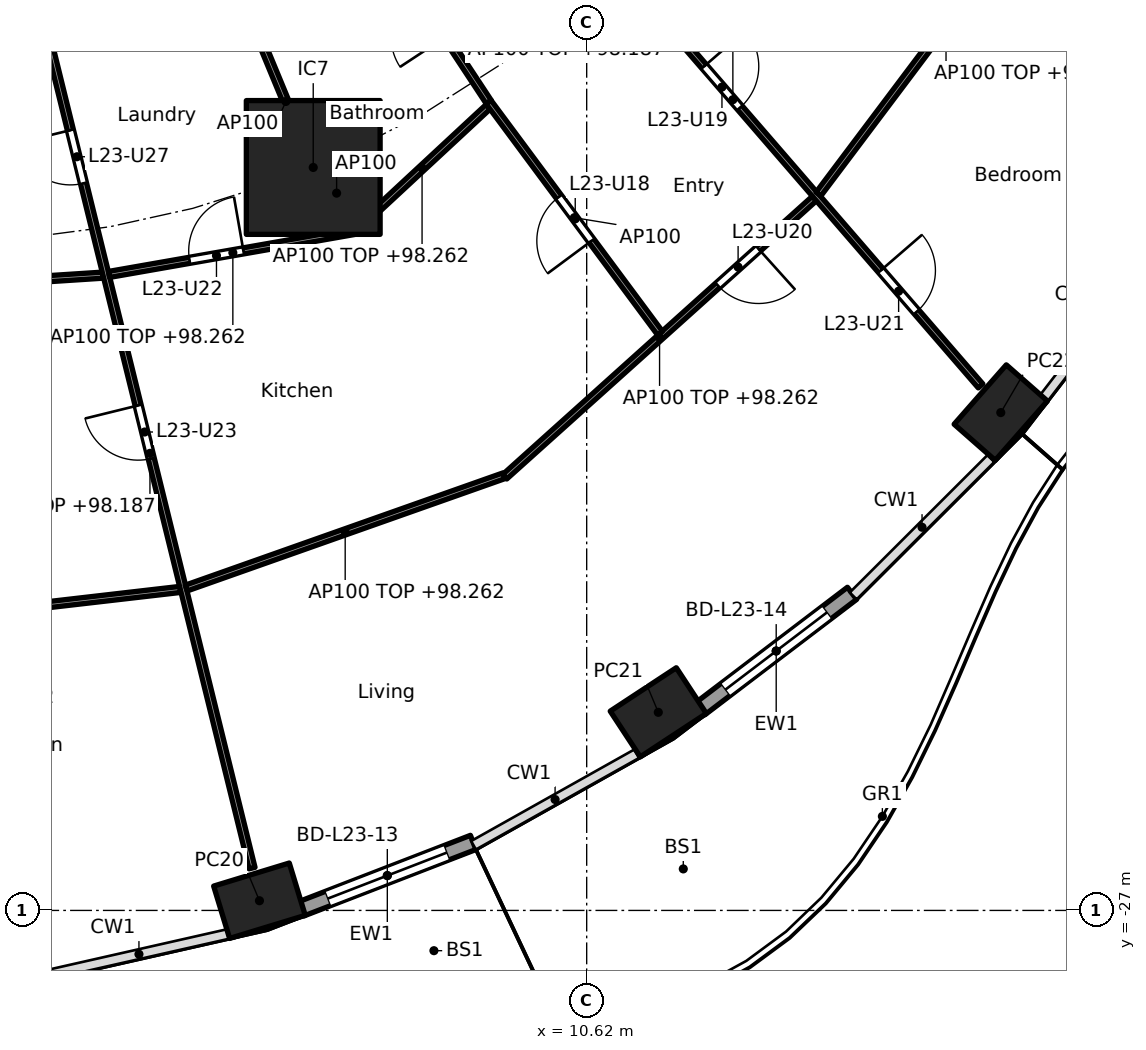
"""IFC4 building model, lengths in metres.
Left out: names, types, materials, properties, quantities, classifications, styles, units other than length and angle.
Written with IfcOpenShell. Run it as: python <this file> out.ifc"""

import sys

from ifc_helpers import new_model, si_unit, direction, frame, frame_2d, origin, origin_2d, place, context, subcontext, project, spatial, rectangle, hollow_rectangle, extrude, element, fill, save


model = new_model("IFC4")
c1 = context("Model", 3, precision=1e-05, world=origin(), true_north=direction((0.0, 1.0)))
c2 = subcontext(c1, "Body", "Model", "MODEL_VIEW")
j1 = project(units=[si_unit("LENGTHUNIT", "METRE"), si_unit("PLANEANGLEUNIT", "RADIAN")], contexts=[c1])
p1 = place(None, origin())
s1 = spatial("IfcSite", under=j1, at=p1, CompositionType="ELEMENT")
p2 = place(p1, origin())
s2 = spatial("IfcBuilding", under=s1, at=p2, CompositionType="ELEMENT")
p3 = place(p2, frame((0.0, 0.0, 95.5)))
s3 = spatial("IfcBuildingStorey", under=s2, at=p3, CompositionType="ELEMENT", Elevation=95.5)
for number, where, z_axis, x_axis in (
    (1, (5.239, -26.841, 0.0), (0.0, 0.0, 1.0), (0.957, 0.292, 0.0)),
    (2, (11.798, -23.742, 0.0), (0.0, 0.0, 1.0), (0.836, 0.549, 0.0)),
    (3, (17.43, -18.813, 0.0), (0.0, 0.0, 1.0), (0.66, 0.751, 0.0)),
):
    element("IfcColumn", number, at=place(p3, frame(where, z_axis=z_axis, x_axis=x_axis)), inside=s3, PredefinedType="COLUMN", context=c2, shape_type="SweptSolid", body=[
        extrude(hollow_rectangle(XDim=1.3, YDim=0.9, WallThickness=0.045, at=origin_2d()), origin(), (0.0, 0.0, 1.0), 3.7),
    ])
p4 = place(p3, frame((6.123, -14.782, 0.0), z_axis=(0.0, 0.0, 1.0), x_axis=(1.0, 0.0, 0.0)))
e4 = element("IfcColumn", 4, at=p4, inside=s3, PredefinedType="COLUMN", context=c2, shape_type="SweptSolid", body=[
    extrude(rectangle(XDim=2.2, YDim=2.2, at=origin_2d()), origin(), (0.0, 0.0, 1.0), 3.7),
])
p5 = place(p3, frame((8.753, -25.882, 0.0), z_axis=(0.0, 0.0, 1.0), x_axis=(-0.932837560624, -0.360297218263, 0.0)))
e5 = element("IfcWall", 5, at=p5, inside=s3, PredefinedType="SOLIDWALL", context=c2, shape_type="SweptSolid", body=[
    extrude(rectangle(XDim=3.028, YDim=0.25, at=frame_2d((1.514, 0.0))), origin(), (0.0, 0.0, 1.0), 3.44),
])
p6 = place(p5, frame((0.464, 0.0, 0.0)))
e6 = element("IfcOpeningElement", 6, at=p6, cuts=e5, PredefinedType="OPENING", context=c2, shape_type="SweptSolid", body=[
    extrude(rectangle(XDim=2.1, YDim=2.4, at=frame_2d((1.05, 1.2))), frame((0.0, 0.135, 0.0), z_axis=(0.0, -1.0, 0.0), x_axis=(1.0, 0.0, 0.0)), (0.0, 0.0, 1.0), 0.27),
])
p7 = place(p3, frame((14.984, -21.785, 0.0), z_axis=(0.0, 0.0, 1.0), x_axis=(-0.796037575978, -0.605247203736, 0.0)))
e7 = element("IfcWall", 7, at=p7, inside=s3, PredefinedType="SOLIDWALL", context=c2, shape_type="SweptSolid", body=[
    extrude(rectangle(XDim=3.134, YDim=0.25, at=frame_2d((1.567, 0.0))), origin(), (0.0, 0.0, 1.0), 3.44),
])
p8 = place(p7, frame((0.517, 0.0, 0.0)))
e8 = element("IfcOpeningElement", 8, at=p8, cuts=e7, PredefinedType="OPENING", context=c2, shape_type="SweptSolid", body=[
    extrude(rectangle(XDim=2.1, YDim=2.4, at=frame_2d((1.05, 1.2))), frame((0.0, 0.135, 0.0), z_axis=(0.0, -1.0, 0.0), x_axis=(1.0, 0.0, 0.0)), (0.0, 0.0, 1.0), 0.27),
])
p9 = place(p3, frame((-1.703, -16.836, 0.0), z_axis=(0.0, 0.0, 1.0), x_axis=(0.997897941075, 0.064805086209, 0.0)))
e9 = element("IfcWall", 9, at=p9, inside=s3, PredefinedType="PARTITIONING", context=c2, shape_type="SweptSolid", body=[
    extrude(rectangle(XDim=4.378, YDim=0.1, at=frame_2d((2.189, 0.0))), origin(), (0.0, 0.0, 1.0), 2.762),
])
p10 = place(p3, frame((-1.726, -22.375, 0.0), z_axis=(0.0, 0.0, 1.0), x_axis=(0.99339223329, 0.114768771187, 0.0)))
e10 = element("IfcWall", 10, at=p10, inside=s3, PredefinedType="PARTITIONING", context=c2, shape_type="SweptSolid", body=[
    extrude(rectangle(XDim=5.701, YDim=0.1, at=frame_2d((2.851, 0.0))), origin(), (0.0, 0.0, 1.0), 2.762),
])
p11 = place(p10, frame((2.4, 0.0, 0.0)))
e11 = element("IfcOpeningElement", 11, at=p11, cuts=e10, PredefinedType="OPENING", context=c2, shape_type="SweptSolid", body=[
    extrude(rectangle(XDim=0.9, YDim=2.1, at=frame_2d((0.45, 1.05))), frame((0.0, 0.06, 0.0), z_axis=(0.0, -1.0, 0.0), x_axis=(1.0, 0.0, 0.0)), (0.0, 0.0, 1.0), 0.12),
])
p12 = place(p3, frame((1.759, -12.662, 0.0), z_axis=(0.0, 0.0, 1.0), x_axis=(0.239021819854, -0.971014196412, 0.0)))
e12 = element("IfcWall", 12, at=p12, inside=s3, PredefinedType="PARTITIONING", context=c2, shape_type="SweptSolid", body=[
    extrude(rectangle(XDim=14.05, YDim=0.1, at=frame_2d((7.025, 0.0))), origin(), (0.0, 0.0, 1.0), 2.687),
])
p13 = place(p12, frame((6.214, 0.0, 0.0)))
e13 = element("IfcOpeningElement", 13, at=p13, cuts=e12, PredefinedType="OPENING", context=c2, shape_type="SweptSolid", body=[
    extrude(rectangle(XDim=0.9, YDim=2.1, at=frame_2d((0.45, 1.05))), frame((0.0, 0.06, 0.0), z_axis=(0.0, -1.0, 0.0), x_axis=(1.0, 0.0, 0.0)), (0.0, 0.0, 1.0), 0.12),
])
p14 = place(p12, frame((1.552, 0.0, 0.0)))
e14 = element("IfcOpeningElement", 14, at=p14, cuts=e12, PredefinedType="OPENING", context=c2, shape_type="SweptSolid", body=[
    extrude(rectangle(XDim=0.9, YDim=2.1, at=frame_2d((0.45, 1.05))), frame((0.0, 0.06, 0.0), z_axis=(0.0, -1.0, 0.0), x_axis=(1.0, 0.0, 0.0)), (0.0, 0.0, 1.0), 0.12),
])
p15 = place(p3, frame((2.765, -16.541, 0.0), z_axis=(0.0, 0.0, 1.0), x_axis=(0.984998612286, 0.172562260633, 0.0)))
e15 = element("IfcWall", 15, at=p15, inside=s3, PredefinedType="PARTITIONING", context=c2, shape_type="SweptSolid", body=[
    extrude(rectangle(XDim=4.134, YDim=0.1, at=frame_2d((2.067, 0.0))), origin(), (0.0, 0.0, 1.0), 2.762),
])
p16 = place(p15, frame((1.344, 0.0, 0.0)))
e16 = element("IfcOpeningElement", 16, at=p16, cuts=e15, PredefinedType="OPENING", context=c2, shape_type="SweptSolid", body=[
    extrude(rectangle(XDim=0.9, YDim=2.1, at=frame_2d((0.45, 1.05))), frame((0.0, 0.06, 0.0), z_axis=(0.0, -1.0, 0.0), x_axis=(1.0, 0.0, 0.0)), (0.0, 0.0, 1.0), 0.12),
])
p17 = place(p3, frame((4.034, -21.698, 0.0), z_axis=(0.0, 0.0, 1.0), x_axis=(0.942864271692, 0.333177077794, 0.0)))
e17 = element("IfcWall", 17, at=p17, inside=s3, PredefinedType="PARTITIONING", context=c2, shape_type="SweptSolid", body=[
    extrude(rectangle(XDim=5.545, YDim=0.1, at=frame_2d((2.772, 0.0))), origin(), (0.0, 0.0, 1.0), 2.762),
])
p18 = place(p3, frame((5.243, -12.657, 0.0), z_axis=(0.0, 0.0, 1.0), x_axis=(0.382719158442, -0.923864733477, 0.0)))
e18 = element("IfcWall", 18, at=p18, inside=s3, PredefinedType="PARTITIONING", context=c2, shape_type="SweptSolid", body=[
    extrude(rectangle(XDim=2.25, YDim=0.1, at=frame_2d((1.125, 0.0))), origin(), (0.0, 0.0, 1.0), 3.44),
])
p19 = place(p3, frame((6.824, -15.802, 0.0), z_axis=(0.0, 0.0, 1.0), x_axis=(0.733007232109, 0.680220844782, 0.0)))
e19 = element("IfcWall", 19, at=p19, inside=s3, PredefinedType="PARTITIONING", context=c2, shape_type="SweptSolid", body=[
    extrude(rectangle(XDim=2.969, YDim=0.1, at=frame_2d((1.485, 0.0))), origin(), (0.0, 0.0, 1.0), 2.762),
])
p20 = place(p3, frame((9.272, -19.868, 0.0), z_axis=(0.0, 0.0, 1.0), x_axis=(0.743884413566, 0.668308296562, 0.0)))
e20 = element("IfcWall", 20, at=p20, inside=s3, PredefinedType="PARTITIONING", context=c2, shape_type="SweptSolid", body=[
    extrude(rectangle(XDim=6.845, YDim=0.1, at=frame_2d((3.423, 0.0))), origin(), (0.0, 0.0, 1.0), 2.762),
])
p21 = place(p20, frame((4.709, 0.0, 0.0)))
e21 = element("IfcOpeningElement", 21, at=p21, cuts=e20, PredefinedType="OPENING", context=c2, shape_type="SweptSolid", body=[
    extrude(rectangle(XDim=0.9, YDim=2.1, at=frame_2d((0.45, 1.05))), frame((0.0, 0.06, 0.0), z_axis=(0.0, -1.0, 0.0), x_axis=(1.0, 0.0, 0.0)), (0.0, 0.0, 1.0), 0.12),
])
p22 = place(p3, frame((7.1, -10.808, 0.0), z_axis=(0.0, 0.0, 1.0), x_axis=(0.550294419528, -0.834970689208, 0.0)))
e22 = element("IfcWall", 22, at=p22, inside=s3, PredefinedType="PARTITIONING", context=c2, shape_type="SweptSolid", body=[
    extrude(rectangle(XDim=3.472, YDim=0.1, at=frame_2d((1.736, 0.0))), origin(), (0.0, 0.0, 1.0), 2.687),
])
p23 = place(p22, frame((1.286, 0.0, 0.0)))
e23 = element("IfcOpeningElement", 23, at=p23, cuts=e22, PredefinedType="OPENING", context=c2, shape_type="SweptSolid", body=[
    extrude(rectangle(XDim=0.9, YDim=2.1, at=frame_2d((0.45, 1.05))), frame((0.0, 0.06, 0.0), z_axis=(0.0, -1.0, 0.0), x_axis=(1.0, 0.0, 0.0)), (0.0, 0.0, 1.0), 0.12),
])
p24 = place(p3, frame((9.008, -13.708, 0.0), z_axis=(0.0, 0.0, 1.0), x_axis=(0.595845850207, -0.803098825047, 0.0)))
e24 = element("IfcWall", 24, at=p24, inside=s3, PredefinedType="PARTITIONING", context=c2, shape_type="SweptSolid", body=[
    extrude(rectangle(XDim=4.729, YDim=0.1, at=frame_2d((2.365, 0.0))), origin(), (0.0, 0.0, 1.0), 3.44),
])
p25 = place(p24, frame((1.94, 0.0, 0.0)))
e25 = element("IfcOpeningElement", 25, at=p25, cuts=e24, PredefinedType="OPENING", context=c2, shape_type="SweptSolid", body=[
    extrude(rectangle(XDim=0.9, YDim=2.1, at=frame_2d((0.45, 1.05))), frame((0.0, 0.06, 0.0), z_axis=(0.0, -1.0, 0.0), x_axis=(1.0, 0.0, 0.0)), (0.0, 0.0, 1.0), 0.12),
])
p26 = place(p3, frame((8.95, -8.96, 0.0), z_axis=(0.0, 0.0, 1.0), x_axis=(0.65441081073, -0.756139200676, 0.0)))
e26 = element("IfcWall", 26, at=p26, inside=s3, PredefinedType="PARTITIONING", context=c2, shape_type="SweptSolid", body=[
    extrude(rectangle(XDim=12.451, YDim=0.1, at=frame_2d((6.226, 0.0))), origin(), (0.0, 0.0, 1.0), 2.687),
])
p27 = place(p26, frame((1.336, 0.0, 0.0)))
e27 = element("IfcOpeningElement", 27, at=p27, cuts=e26, PredefinedType="OPENING", context=c2, shape_type="SweptSolid", body=[
    extrude(rectangle(XDim=0.9, YDim=2.1, at=frame_2d((0.45, 1.05))), frame((0.0, 0.06, 0.0), z_axis=(0.0, -1.0, 0.0), x_axis=(1.0, 0.0, 0.0)), (0.0, 0.0, 1.0), 0.12),
])
p28 = place(p26, frame((5.501, 0.0, 0.0)))
e28 = element("IfcOpeningElement", 28, at=p28, cuts=e26, PredefinedType="OPENING", context=c2, shape_type="SweptSolid", body=[
    extrude(rectangle(XDim=0.9, YDim=2.1, at=frame_2d((0.45, 1.05))), frame((0.0, 0.06, 0.0), z_axis=(0.0, -1.0, 0.0), x_axis=(1.0, 0.0, 0.0)), (0.0, 0.0, 1.0), 0.12),
])
p29 = place(p26, frame((9.941, 0.0, 0.0)))
e29 = element("IfcOpeningElement", 29, at=p29, cuts=e26, PredefinedType="OPENING", context=c2, shape_type="SweptSolid", body=[
    extrude(rectangle(XDim=0.9, YDim=2.1, at=frame_2d((0.45, 1.05))), frame((0.0, 0.06, 0.0), z_axis=(0.0, -1.0, 0.0), x_axis=(1.0, 0.0, 0.0)), (0.0, 0.0, 1.0), 0.12),
])
p30 = place(p3, frame((14.432, -15.219, 0.0), z_axis=(0.0, 0.0, 1.0), x_axis=(0.601001256685, 0.799248077548, 0.0)))
e30 = element("IfcWall", 30, at=p30, inside=s3, PredefinedType="PARTITIONING", context=c2, shape_type="SweptSolid", body=[
    extrude(rectangle(XDim=6.98, YDim=0.1, at=frame_2d((3.49, 0.0))), origin(), (0.0, 0.0, 1.0), 2.762),
])
p31 = place(p30, frame((4.798, 0.0, 0.0)))
e31 = element("IfcOpeningElement", 31, at=p31, cuts=e30, PredefinedType="OPENING", context=c2, shape_type="SweptSolid", body=[
    extrude(rectangle(XDim=0.9, YDim=2.1, at=frame_2d((0.45, 1.05))), frame((0.0, 0.06, 0.0), z_axis=(0.0, -1.0, 0.0), x_axis=(1.0, 0.0, 0.0)), (0.0, 0.0, 1.0), 0.12),
])
p32 = place(p3, frame((6.781, -15.638, 0.0), z_axis=(0.0, 0.0, 1.0), x_axis=(-0.533419461524, 0.845850860417, 0.0)))
e32 = element("IfcWall", 32, at=p32, inside=s3, PredefinedType="PARTITIONING", context=c2, shape_type="SweptSolid", body=[
    extrude(rectangle(XDim=1.025, YDim=0.1, at=frame_2d((0.513, 0.0))), origin(), (0.0, 0.0, 1.0), 3.44),
])
p33 = place(p6, origin())
e33 = element("IfcDoor", 33, at=p33, inside=s3, OperationType="SLIDING_TO_LEFT", PredefinedType="DOOR", context=c2, shape_type="SweptSolid", body=[
    extrude(rectangle(XDim=2.1, YDim=2.4, at=frame_2d((1.05, 1.2))), frame((0.0, 0.025, 0.0), z_axis=(0.0, -1.0, 0.0), x_axis=(1.0, 0.0, 0.0)), (0.0, 0.0, 1.0), 0.05),
])
fill(e6, e33)
p34 = place(p8, origin())
e34 = element("IfcDoor", 34, at=p34, inside=s3, OperationType="SLIDING_TO_LEFT", PredefinedType="DOOR", context=c2, shape_type="SweptSolid", body=[
    extrude(rectangle(XDim=2.1, YDim=2.4, at=frame_2d((1.05, 1.2))), frame((0.0, 0.025, 0.0), z_axis=(0.0, -1.0, 0.0), x_axis=(1.0, 0.0, 0.0)), (0.0, 0.0, 1.0), 0.05),
])
fill(e8, e34)
p35 = place(p25, frame((0.9, 0.0, 0.0), x_axis=(-1.0, 0.0, 0.0)))
e35 = element("IfcDoor", 35, at=p35, inside=s3, OperationType="SINGLE_SWING_LEFT", PredefinedType="DOOR", context=c2, shape_type="SweptSolid", body=[
    extrude(rectangle(XDim=0.9, YDim=2.1, at=frame_2d((0.45, 1.05))), frame((0.0, 0.025, 0.0), z_axis=(0.0, -1.0, 0.0), x_axis=(1.0, 0.0, 0.0)), (0.0, 0.0, 1.0), 0.05),
])
fill(e25, e35)
p36 = place(p28, origin())
e36 = element("IfcDoor", 36, at=p36, inside=s3, OperationType="SINGLE_SWING_LEFT", PredefinedType="DOOR", context=c2, shape_type="SweptSolid", body=[
    extrude(rectangle(XDim=0.9, YDim=2.1, at=frame_2d((0.45, 1.05))), frame((0.0, 0.025, 0.0), z_axis=(0.0, -1.0, 0.0), x_axis=(1.0, 0.0, 0.0)), (0.0, 0.0, 1.0), 0.05),
])
fill(e28, e36)
p37 = place(p21, frame((0.9, 0.0, 0.0), x_axis=(-1.0, 0.0, 0.0)))
e37 = element("IfcDoor", 37, at=p37, inside=s3, OperationType="SINGLE_SWING_LEFT", PredefinedType="DOOR", context=c2, shape_type="SweptSolid", body=[
    extrude(rectangle(XDim=0.9, YDim=2.1, at=frame_2d((0.45, 1.05))), frame((0.0, 0.025, 0.0), z_axis=(0.0, -1.0, 0.0), x_axis=(1.0, 0.0, 0.0)), (0.0, 0.0, 1.0), 0.05),
])
fill(e21, e37)
p38 = place(p29, origin())
e38 = element("IfcDoor", 38, at=p38, inside=s3, OperationType="SINGLE_SWING_LEFT", PredefinedType="DOOR", context=c2, shape_type="SweptSolid", body=[
    extrude(rectangle(XDim=0.9, YDim=2.1, at=frame_2d((0.45, 1.05))), frame((0.0, 0.025, 0.0), z_axis=(0.0, -1.0, 0.0), x_axis=(1.0, 0.0, 0.0)), (0.0, 0.0, 1.0), 0.05),
])
fill(e29, e38)
p39 = place(p16, origin())
e39 = element("IfcDoor", 39, at=p39, inside=s3, OperationType="SINGLE_SWING_RIGHT", PredefinedType="DOOR", context=c2, shape_type="SweptSolid", body=[
    extrude(rectangle(XDim=0.9, YDim=2.1, at=frame_2d((0.45, 1.05))), frame((0.0, 0.025, 0.0), z_axis=(0.0, -1.0, 0.0), x_axis=(1.0, 0.0, 0.0)), (0.0, 0.0, 1.0), 0.05),
])
fill(e16, e39)
p40 = place(p13, frame((0.9, 0.0, 0.0), x_axis=(-1.0, 0.0, 0.0)))
e40 = element("IfcDoor", 40, at=p40, inside=s3, OperationType="SINGLE_SWING_RIGHT", PredefinedType="DOOR", context=c2, shape_type="SweptSolid", body=[
    extrude(rectangle(XDim=0.9, YDim=2.1, at=frame_2d((0.45, 1.05))), frame((0.0, 0.025, 0.0), z_axis=(0.0, -1.0, 0.0), x_axis=(1.0, 0.0, 0.0)), (0.0, 0.0, 1.0), 0.05),
])
fill(e13, e40)
p41 = place(p14, frame((0.9, 0.0, 0.0), x_axis=(-1.0, 0.0, 0.0)))
e41 = element("IfcDoor", 41, at=p41, inside=s3, OperationType="SINGLE_SWING_RIGHT", PredefinedType="DOOR", context=c2, shape_type="SweptSolid", body=[
    extrude(rectangle(XDim=0.9, YDim=2.1, at=frame_2d((0.45, 1.05))), frame((0.0, 0.025, 0.0), z_axis=(0.0, -1.0, 0.0), x_axis=(1.0, 0.0, 0.0)), (0.0, 0.0, 1.0), 0.05),
])
fill(e14, e41)
save(model, sys.argv[1])
